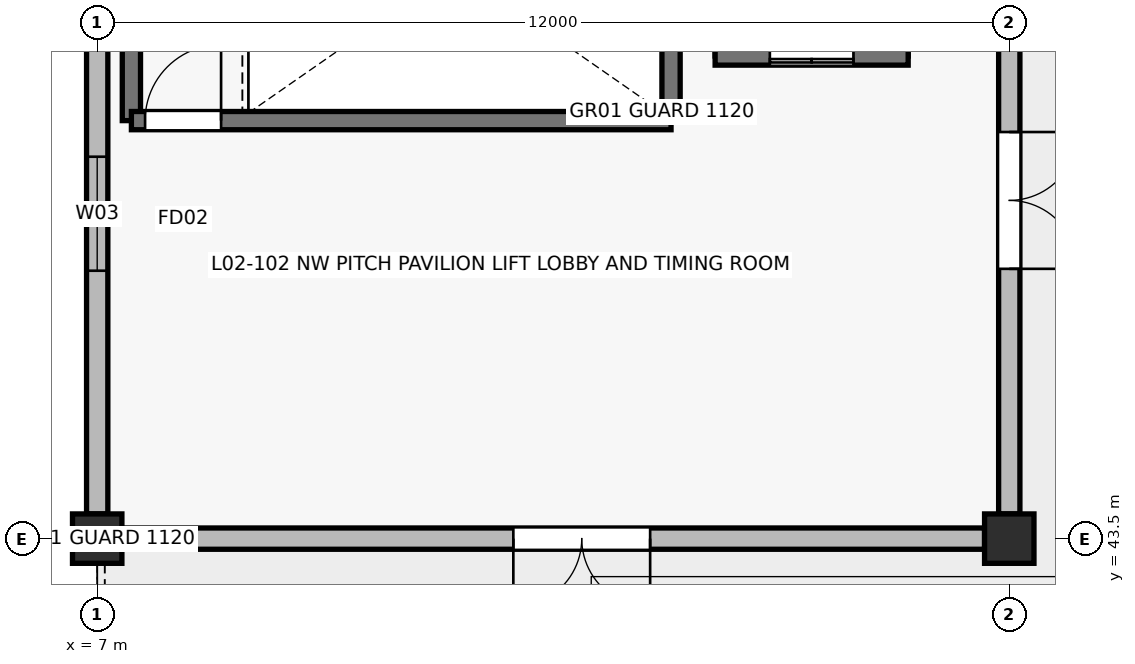
"""IFC4 building model, lengths in metres.
Left out: names, types, materials, properties, quantities, classifications, styles, units other than length and angle.
Written with IfcOpenShell. Run it as: python <this file> out.ifc"""

import sys

from ifc_helpers import new_model, si_unit, direction, frame, frame_2d, origin, origin_2d, place, context, subcontext, project, spatial, rectangle, extrude, element, fill, save


model = new_model("IFC4")
c1 = context("Model", 3, precision=1e-05, world=origin(), true_north=direction((0.0, 1.0)))
c2 = subcontext(c1, "Body", "Model", "MODEL_VIEW")
j1 = project(units=[si_unit("LENGTHUNIT", "METRE"), si_unit("PLANEANGLEUNIT", "RADIAN")], contexts=[c1])
p1 = place(None, origin())
s1 = spatial("IfcSite", under=j1, at=p1, CompositionType="ELEMENT")
p2 = place(p1, origin())
s2 = spatial("IfcBuilding", under=s1, at=p2, CompositionType="ELEMENT")
p3 = place(p2, frame((0.0, 0.0, 9.0)))
s3 = spatial("IfcBuildingStorey", under=s2, at=p3, CompositionType="ELEMENT", Elevation=9.0)
for number, where, z_axis, x_axis in (
    (1, (7.0, 43.5, 0.0), (0.0, 0.0, 1.0), (1.0, 0.0, 0.0)),
    (2, (19.0, 43.5, 0.0), (0.0, 0.0, 1.0), (1.0, 0.0, 0.0)),
):
    element("IfcColumn", number, at=place(p3, frame(where, z_axis=z_axis, x_axis=x_axis)), inside=s3, PredefinedType="COLUMN", context=c2, shape_type="SweptSolid", body=[
        extrude(rectangle(XDim=0.65, YDim=0.65, at=origin_2d()), origin(), (0.0, 0.0, 1.0), 4.2),
    ])
p4 = place(p3, frame((7.0, 43.825, 0.0), z_axis=(0.0, 0.0, 1.0), x_axis=(0.0, 1.0, 0.0)))
e3 = element("IfcWall", 3, at=p4, inside=s3, PredefinedType="SOLIDWALL", context=c2, shape_type="SweptSolid", body=[
    extrude(rectangle(XDim=9.225, YDim=0.28, at=frame_2d((4.613, 0.0))), origin(), (0.0, 0.0, 1.0), 3.1),
])
p5 = place(p4, frame((3.2, 0.0, 0.9)))
e4 = element("IfcOpeningElement", 4, at=p5, cuts=e3, PredefinedType="OPENING", context=c2, shape_type="SweptSolid", body=[
    extrude(rectangle(XDim=1.5, YDim=1.5, at=frame_2d((0.75, 0.75))), frame((0.0, 0.15, 0.0), z_axis=(0.0, -1.0, 0.0), x_axis=(1.0, 0.0, 0.0)), (0.0, 0.0, 1.0), 0.3),
])
p6 = place(p3, frame((19.0, 53.05, 0.0), z_axis=(0.0, 0.0, 1.0), x_axis=(0.0, -1.0, 0.0)))
e5 = element("IfcWall", 5, at=p6, inside=s3, PredefinedType="SOLIDWALL", context=c2, shape_type="SweptSolid", body=[
    extrude(rectangle(XDim=9.225, YDim=0.28, at=frame_2d((4.613, 0.0))), origin(), (0.0, 0.0, 1.0), 3.1),
])
p7 = place(p6, frame((4.2, 0.0, 0.0)))
e6 = element("IfcOpeningElement", 6, at=p7, cuts=e5, PredefinedType="OPENING", context=c2, shape_type="SweptSolid", body=[
    extrude(rectangle(XDim=1.8, YDim=2.25, at=frame_2d((0.9, 1.125))), frame((0.0, 0.15, 0.0), z_axis=(0.0, -1.0, 0.0), x_axis=(1.0, 0.0, 0.0)), (0.0, 0.0, 1.0), 0.3),
])
p8 = place(p3, frame((18.675, 43.5, 0.0), z_axis=(0.0, 0.0, 1.0), x_axis=(-1.0, 0.0, 0.0)))
e7 = element("IfcWall", 7, at=p8, inside=s3, PredefinedType="SOLIDWALL", context=c2, shape_type="SweptSolid", body=[
    extrude(rectangle(XDim=11.35, YDim=0.28, at=frame_2d((5.675, 0.0))), origin(), (0.0, 0.0, 1.0), 3.1),
])
p9 = place(p8, frame((4.4, 0.0, 0.0)))
e8 = element("IfcOpeningElement", 8, at=p9, cuts=e7, PredefinedType="OPENING", context=c2, shape_type="SweptSolid", body=[
    extrude(rectangle(XDim=1.8, YDim=2.25, at=frame_2d((0.9, 1.125))), frame((0.0, 0.15, 0.0), z_axis=(0.0, -1.0, 0.0), x_axis=(1.0, 0.0, 0.0)), (0.0, 0.0, 1.0), 0.3),
])
for number, where, z_axis, x_axis in (
    (9, (15.25, 49.85, 0.0), (0.0, 0.0, 1.0), (0.0, 1.0, 0.0)),
    (10, (17.55, 52.55, 0.0), (0.0, 0.0, 1.0), (0.0, -1.0, 0.0)),
):
    element("IfcWall", number, at=place(p3, frame(where, z_axis=z_axis, x_axis=x_axis)), inside=s3, PredefinedType="SHEAR", context=c2, shape_type="SweptSolid", body=[
        extrude(rectangle(XDim=2.7, YDim=0.24, at=frame_2d((1.35, 0.0))), origin(), (0.0, 0.0, 1.0), 3.98),
    ])
p10 = place(p3, frame((17.67, 49.85, 0.0), z_axis=(0.0, 0.0, 1.0), x_axis=(-1.0, 0.0, 0.0)))
e11 = element("IfcWall", 11, at=p10, inside=s3, PredefinedType="SHEAR", context=c2, shape_type="SweptSolid", body=[
    extrude(rectangle(XDim=2.54, YDim=0.24, at=frame_2d((1.27, 0.0))), origin(), (0.0, 0.0, 1.0), 3.98),
])
p11 = place(p10, frame((0.72, 0.0, 0.0)))
e12 = element("IfcOpeningElement", 12, at=p11, cuts=e11, PredefinedType="OPENING", context=c2, shape_type="SweptSolid", body=[
    extrude(rectangle(XDim=1.1, YDim=2.15, at=frame_2d((0.55, 1.075))), frame((0.0, 0.13, 0.0), z_axis=(0.0, -1.0, 0.0), x_axis=(1.0, 0.0, 0.0)), (0.0, 0.0, 1.0), 0.26),
])
for number, where, z_axis, x_axis in (
    (13, (7.45, 49.0, 0.0), (0.0, 0.0, 1.0), (0.0, 1.0, 0.0)),
    (14, (14.55, 49.0, 0.0), (0.0, 0.0, 1.0), (0.0, 1.0, 0.0)),
):
    element("IfcWall", number, at=place(p3, frame(where, z_axis=z_axis, x_axis=x_axis)), inside=s3, PredefinedType="SHEAR", context=c2, shape_type="SweptSolid", body=[
        extrude(rectangle(XDim=4.0, YDim=0.24, at=frame_2d((2.0, 0.0))), origin(), (0.0, 0.0, 1.0), 3.98),
    ])
p12 = place(p3, frame((7.45, 49.0, 0.0), z_axis=(0.0, 0.0, 1.0), x_axis=(1.0, 0.0, 0.0)))
e15 = element("IfcWall", 15, at=p12, inside=s3, PredefinedType="SHEAR", context=c2, shape_type="SweptSolid", body=[
    extrude(rectangle(XDim=7.1, YDim=0.24, at=frame_2d((3.55, 0.0))), origin(), (0.0, 0.0, 1.0), 3.98),
])
p13 = place(p12, frame((0.18, 0.0, 0.0)))
e16 = element("IfcOpeningElement", 16, at=p13, cuts=e15, PredefinedType="OPENING", context=c2, shape_type="SweptSolid", body=[
    extrude(rectangle(XDim=1.0, YDim=2.15, at=frame_2d((0.5, 1.075))), frame((0.0, 0.13, 0.0), z_axis=(0.0, -1.0, 0.0), x_axis=(1.0, 0.0, 0.0)), (0.0, 0.0, 1.0), 0.26),
])
p14 = place(p5, origin())
e17 = element("IfcWindow", 17, at=p14, inside=s3, PartitioningType="SINGLE_PANEL", PredefinedType="WINDOW", context=c2, shape_type="SweptSolid", body=[
    extrude(rectangle(XDim=1.5, YDim=1.5, at=frame_2d((0.75, 0.75))), frame((0.0, 0.03, 0.0), z_axis=(0.0, -1.0, 0.0), x_axis=(1.0, 0.0, 0.0)), (0.0, 0.0, 1.0), 0.06),
])
fill(e4, e17)
p15 = place(p7, origin())
e18 = element("IfcDoor", 18, at=p15, inside=s3, OperationType="DOUBLE_DOOR_SINGLE_SWING", PredefinedType="DOOR", context=c2, shape_type="SweptSolid", body=[
    extrude(rectangle(XDim=1.8, YDim=2.25, at=frame_2d((0.9, 1.125))), frame((0.0, 0.025, 0.0), z_axis=(0.0, -1.0, 0.0), x_axis=(1.0, 0.0, 0.0)), (0.0, 0.0, 1.0), 0.05),
])
fill(e6, e18)
p16 = place(p9, origin())
e19 = element("IfcDoor", 19, at=p16, inside=s3, OperationType="DOUBLE_DOOR_SINGLE_SWING", PredefinedType="DOOR", context=c2, shape_type="SweptSolid", body=[
    extrude(rectangle(XDim=1.8, YDim=2.25, at=frame_2d((0.9, 1.125))), frame((0.0, 0.025, 0.0), z_axis=(0.0, -1.0, 0.0), x_axis=(1.0, 0.0, 0.0)), (0.0, 0.0, 1.0), 0.05),
])
fill(e8, e19)
p17 = place(p11, origin())
e20 = element("IfcDoor", 20, at=p17, inside=s3, OperationType="DOUBLE_DOOR_SLIDING", PredefinedType="USERDEFINED", context=c2, shape_type="SweptSolid", body=[
    extrude(rectangle(XDim=1.1, YDim=2.15, at=frame_2d((0.55, 1.075))), frame((0.0, 0.025, 0.0), z_axis=(0.0, -1.0, 0.0), x_axis=(1.0, 0.0, 0.0)), (0.0, 0.0, 1.0), 0.05),
])
fill(e12, e20)
p18 = place(p13, origin())
e21 = element("IfcDoor", 21, at=p18, inside=s3, OperationType="SINGLE_SWING_RIGHT", PredefinedType="DOOR", context=c2, shape_type="SweptSolid", body=[
    extrude(rectangle(XDim=1.0, YDim=2.15, at=frame_2d((0.5, 1.075))), frame((0.0, 0.025, 0.0), z_axis=(0.0, -1.0, 0.0), x_axis=(1.0, 0.0, 0.0)), (0.0, 0.0, 1.0), 0.05),
])
fill(e16, e21)
save(model, sys.argv[1])
